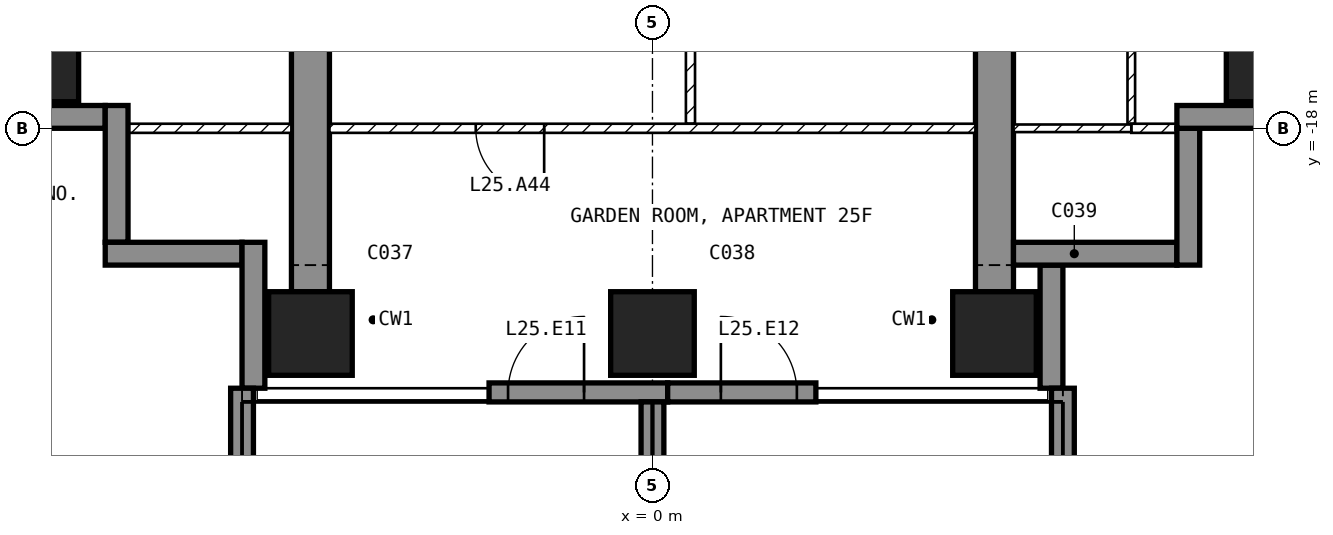
"""IFC4 building model, lengths in metres.
Left out: names, types, materials, properties, quantities, classifications, styles, units other than length and angle.
Written with IfcOpenShell. Run it as: python <this file> out.ifc"""

import sys

from ifc_helpers import new_model, si_unit, direction, frame, frame_2d, origin, origin_2d, place, context, subcontext, project, spatial, polyline, rectangle, outline, extrude, element, fill, save


model = new_model("IFC4")
c1 = context("Model", 3, precision=1e-05, world=origin(), true_north=direction((0.0, 1.0)))
c2 = subcontext(c1, "Body", "Model", "MODEL_VIEW")
j1 = project(units=[si_unit("LENGTHUNIT", "METRE"), si_unit("PLANEANGLEUNIT", "RADIAN")], contexts=[c1])
p1 = place(None, origin())
s1 = spatial("IfcSite", under=j1, at=p1, CompositionType="ELEMENT")
p2 = place(p1, origin())
s2 = spatial("IfcBuilding", under=s1, at=p2, CompositionType="ELEMENT")
p3 = place(p2, frame((0.0, 0.0, 109.4)))
s3 = spatial("IfcBuildingStorey", under=s2, at=p3, CompositionType="ELEMENT", Elevation=109.4)
for number, where, z_axis, x_axis in (
    (1, (-8.1, -17.1, -0.25), (0.0, 0.0, 1.0), (1.0, 0.0, 0.0)),
    (2, (-4.5, -20.7, -0.25), (0.0, 0.0, 1.0), (1.0, 0.0, 0.0)),
    (3, (0.0, -20.7, -0.25), (0.0, 0.0, 1.0), (1.0, 0.0, 0.0)),
    (4, (4.5, -20.7, -0.25), (0.0, 0.0, 1.0), (1.0, 0.0, 0.0)),
    (5, (8.1, -17.1, -0.25), (0.0, 0.0, 1.0), (1.0, 0.0, 0.0)),
):
    element("IfcColumn", number, at=place(p3, frame(where, z_axis=z_axis, x_axis=x_axis)), inside=s3, PredefinedType="COLUMN", context=c2, shape_type="SweptSolid", body=[
        extrude(rectangle(XDim=1.1, YDim=1.1, at=origin_2d()), origin(), (0.0, 0.0, 1.0), 3.5),
    ])
for number, where, z_axis, x_axis in (
    (6, (-4.75, -20.15, -0.25), (1.0, 0.0, 0.0), (0.0, 1.0, 0.0)),
    (7, (4.25, -20.15, -0.25), (1.0, 0.0, 0.0), (0.0, 1.0, 0.0)),
):
    element("IfcWall", number, at=place(p3, frame(where, z_axis=z_axis, x_axis=x_axis)), inside=s3, PredefinedType="SHEAR", context=c2, shape_type="SweptSolid", body=[
        extrude(outline(polyline([(0.0, 0.0), (6.65, 0.0), (6.65, 2.65), (9.05, 2.65), (9.05, 0.0), (11.15, 0.0), (11.15, 3.5), (0.0, 3.5), (0.0, 0.0)])), origin(), (0.0, 0.0, 1.0), 0.5),
    ])
p4 = place(p3, frame((-2.15, -21.475, 0.0), z_axis=(0.0, 0.0, 1.0), x_axis=(1.0, 0.0, 0.0)))
e8 = element("IfcWall", 8, at=p4, inside=s3, PredefinedType="SOLIDWALL", context=c2, shape_type="SweptSolid", body=[
    extrude(rectangle(XDim=2.35, YDim=0.25, at=frame_2d((1.175, 0.0))), origin(), (0.0, 0.0, 1.0), 3.25),
])
p5 = place(p4, frame((0.25, 0.0, 0.0)))
e9 = element("IfcOpeningElement", 9, at=p5, cuts=e8, PredefinedType="OPENING", context=c2, shape_type="SweptSolid", body=[
    extrude(rectangle(XDim=1.0, YDim=2.4, at=frame_2d((0.5, 1.2))), frame((0.0, 0.135, 0.0), z_axis=(0.0, -1.0, 0.0), x_axis=(1.0, 0.0, 0.0)), (0.0, 0.0, 1.0), 0.27),
])
p6 = place(p3, frame((0.2, -21.475, 0.0), z_axis=(0.0, 0.0, 1.0), x_axis=(1.0, 0.0, 0.0)))
e10 = element("IfcWall", 10, at=p6, inside=s3, PredefinedType="SOLIDWALL", context=c2, shape_type="SweptSolid", body=[
    extrude(rectangle(XDim=1.95, YDim=0.25, at=frame_2d((0.975, 0.0))), origin(), (0.0, 0.0, 1.0), 3.25),
])
p7 = place(p6, frame((0.7, 0.0, 0.0)))
e11 = element("IfcOpeningElement", 11, at=p7, cuts=e10, PredefinedType="OPENING", context=c2, shape_type="SweptSolid", body=[
    extrude(rectangle(XDim=1.0, YDim=2.4, at=frame_2d((0.5, 1.2))), frame((0.0, 0.135, 0.0), z_axis=(0.0, -1.0, 0.0), x_axis=(1.0, 0.0, 0.0)), (0.0, 0.0, 1.0), 0.27),
])
p8 = place(p3, frame((5.25, -21.42, 0.0), z_axis=(0.0, 0.0, 1.0), x_axis=(0.0, 1.0, 0.0)))
e12 = element("IfcWall", 12, at=p8, inside=s3, PredefinedType="SOLIDWALL", context=c2, shape_type="SweptSolid", body=[
    extrude(rectangle(XDim=1.62, YDim=0.3, at=frame_2d((0.81, 0.0))), origin(), (0.0, 0.0, 1.0), 3.25),
])
p9 = place(p3, frame((4.75, -19.65, 0.0), z_axis=(0.0, 0.0, 1.0), x_axis=(1.0, 0.0, 0.0)))
e13 = element("IfcWall", 13, at=p9, inside=s3, PredefinedType="SOLIDWALL", context=c2, shape_type="SweptSolid", body=[
    extrude(rectangle(XDim=2.15, YDim=0.3, at=frame_2d((1.075, 0.0))), origin(), (0.0, 0.0, 1.0), 3.25),
])
p10 = place(p3, frame((7.05, -19.8, 0.0), z_axis=(0.0, 0.0, 1.0), x_axis=(0.0, 1.0, 0.0)))
e14 = element("IfcWall", 14, at=p10, inside=s3, PredefinedType="SOLIDWALL", context=c2, shape_type="SweptSolid", body=[
    extrude(rectangle(XDim=1.8, YDim=0.3, at=frame_2d((0.9, 0.0))), origin(), (0.0, 0.0, 1.0), 3.25),
])
p11 = place(p3, frame((6.9, -17.85, 0.0), z_axis=(0.0, 0.0, 1.0), x_axis=(1.0, 0.0, 0.0)))
e15 = element("IfcWall", 15, at=p11, inside=s3, PredefinedType="SOLIDWALL", context=c2, shape_type="SweptSolid", body=[
    extrude(rectangle(XDim=1.85, YDim=0.3, at=frame_2d((0.925, 0.0))), origin(), (0.0, 0.0, 1.0), 3.25),
])
p12 = place(p3, frame((-8.75, -17.85, 0.0), z_axis=(0.0, 0.0, 1.0), x_axis=(1.0, 0.0, 0.0)))
e16 = element("IfcWall", 16, at=p12, inside=s3, PredefinedType="SOLIDWALL", context=c2, shape_type="SweptSolid", body=[
    extrude(rectangle(XDim=1.55, YDim=0.3, at=frame_2d((0.775, 0.0))), origin(), (0.0, 0.0, 1.0), 3.25),
])
for number, where, z_axis, x_axis in (
    (17, (-7.05, -17.7, 0.0), (0.0, 0.0, 1.0), (0.0, -1.0, 0.0)),
    (18, (-7.2, -19.65, 0.0), (0.0, 0.0, 1.0), (1.0, 0.0, 0.0)),
):
    element("IfcWall", number, at=place(p3, frame(where, z_axis=z_axis, x_axis=x_axis)), inside=s3, PredefinedType="SOLIDWALL", context=c2, shape_type="SweptSolid", body=[
        extrude(rectangle(XDim=1.8, YDim=0.3, at=frame_2d((0.9, 0.0))), origin(), (0.0, 0.0, 1.0), 3.25),
    ])
p13 = place(p3, frame((-5.25, -19.5, 0.0), z_axis=(0.0, 0.0, 1.0), x_axis=(0.0, -1.0, 0.0)))
e19 = element("IfcWall", 19, at=p13, inside=s3, PredefinedType="SOLIDWALL", context=c2, shape_type="SweptSolid", body=[
    extrude(rectangle(XDim=1.92, YDim=0.3, at=frame_2d((0.96, 0.0))), origin(), (0.0, 0.0, 1.0), 3.25),
])
p14 = place(p3, frame((-5.4, -21.42, 0.0), z_axis=(0.0, 0.0, 1.0), x_axis=(0.0, -1.0, 0.0)))
e20 = element("IfcWall", 20, at=p14, inside=s3, PredefinedType="SOLIDWALL", context=c2, shape_type="SweptSolid", body=[
    extrude(rectangle(XDim=2.88, YDim=0.3, at=frame_2d((1.44, 0.0))), origin(), (0.0, 0.0, 1.0), 3.25),
])
p15 = place(p3, frame((0.0, -21.6, 0.0), z_axis=(0.0, 0.0, 1.0), x_axis=(0.0, -1.0, 0.0)))
e21 = element("IfcWall", 21, at=p15, inside=s3, PredefinedType="SOLIDWALL", context=c2, shape_type="SweptSolid", body=[
    extrude(rectangle(XDim=2.7, YDim=0.3, at=frame_2d((1.35, 0.0))), origin(), (0.0, 0.0, 1.0), 3.25),
])
p16 = place(p3, frame((5.4, -21.42, 0.0), z_axis=(0.0, 0.0, 1.0), x_axis=(0.0, -1.0, 0.0)))
e22 = element("IfcWall", 22, at=p16, inside=s3, PredefinedType="SOLIDWALL", context=c2, shape_type="SweptSolid", body=[
    extrude(rectangle(XDim=2.88, YDim=0.3, at=frame_2d((1.44, 0.0))), origin(), (0.0, 0.0, 1.0), 3.25),
])
p17 = place(p3, frame((0.5, -15.06, 0.0), z_axis=(0.0, 0.0, 1.0), x_axis=(0.0, -1.0, 0.0)))
e23 = element("IfcWall", 23, at=p17, inside=s3, PredefinedType="PARTITIONING", context=c2, shape_type="SweptSolid", body=[
    extrude(rectangle(XDim=2.88, YDim=0.12, at=frame_2d((1.44, 0.0))), origin(), (0.0, 0.0, 1.0), 3.25),
])
p18 = place(p3, frame((4.25, -18.0, 0.0), z_axis=(0.0, 0.0, 1.0), x_axis=(-1.0, 0.0, 0.0)))
e24 = element("IfcWall", 24, at=p18, inside=s3, PredefinedType="PARTITIONING", context=c2, shape_type="SweptSolid", body=[
    extrude(rectangle(XDim=8.5, YDim=0.12, at=frame_2d((4.25, 0.0))), origin(), (0.0, 0.0, 1.0), 3.25),
])
p19 = place(p18, frame((5.675, 0.0, 0.0)))
e25 = element("IfcOpeningElement", 25, at=p19, cuts=e24, PredefinedType="OPENING", context=c2, shape_type="SweptSolid", body=[
    extrude(rectangle(XDim=0.9, YDim=2.1, at=frame_2d((0.45, 1.05))), frame((0.0, 0.07, 0.0), z_axis=(0.0, -1.0, 0.0), x_axis=(1.0, 0.0, 0.0)), (0.0, 0.0, 1.0), 0.14),
])
p20 = place(p3, frame((6.3, -17.94, 0.0), z_axis=(0.0, 0.0, 1.0), x_axis=(0.0, 1.0, 0.0)))
e26 = element("IfcWall", 26, at=p20, inside=s3, PredefinedType="PARTITIONING", context=c2, shape_type="SweptSolid", body=[
    extrude(rectangle(XDim=3.49, YDim=0.1, at=frame_2d((1.745, 0.0))), origin(), (0.0, 0.0, 1.0), 3.25),
])
p21 = place(p20, frame((1.32, 0.0, 0.0)))
e27 = element("IfcOpeningElement", 27, at=p21, cuts=e26, PredefinedType="OPENING", context=c2, shape_type="SweptSolid", body=[
    extrude(rectangle(XDim=0.85, YDim=2.1, at=frame_2d((0.425, 1.05))), frame((0.0, 0.06, 0.0), z_axis=(0.0, -1.0, 0.0), x_axis=(1.0, 0.0, 0.0)), (0.0, 0.0, 1.0), 0.12),
])
p22 = place(p3, frame((7.12, -18.0, 0.0), z_axis=(0.0, 0.0, 1.0), x_axis=(-1.0, 0.0, 0.0)))
e28 = element("IfcWall", 28, at=p22, inside=s3, PredefinedType="PARTITIONING", context=c2, shape_type="SweptSolid", body=[
    extrude(rectangle(XDim=0.82, YDim=0.12, at=frame_2d((0.41, 0.0))), origin(), (0.0, 0.0, 1.0), 3.25),
])
p23 = place(p3, frame((6.3, -18.0, 0.0), z_axis=(0.0, 0.0, 1.0), x_axis=(-1.0, 0.0, 0.0)))
e29 = element("IfcWall", 29, at=p23, inside=s3, PredefinedType="PARTITIONING", context=c2, shape_type="SweptSolid", body=[
    extrude(rectangle(XDim=1.55, YDim=0.1, at=frame_2d((0.775, 0.0))), origin(), (0.0, 0.0, 1.0), 3.25),
])
p24 = place(p3, frame((-4.75, -18.0, 0.0), z_axis=(0.0, 0.0, 1.0), x_axis=(-1.0, 0.0, 0.0)))
e30 = element("IfcWall", 30, at=p24, inside=s3, PredefinedType="PARTITIONING", context=c2, shape_type="SweptSolid", body=[
    extrude(rectangle(XDim=2.37, YDim=0.12, at=frame_2d((1.185, 0.0))), origin(), (0.0, 0.0, 1.0), 3.25),
])
p25 = place(p5, origin())
e31 = element("IfcDoor", 31, at=p25, inside=s3, OperationType="SINGLE_SWING_RIGHT", PredefinedType="DOOR", context=c2, shape_type="SweptSolid", body=[
    extrude(rectangle(XDim=1.0, YDim=2.4, at=frame_2d((0.5, 1.2))), frame((0.0, 0.025, 0.0), z_axis=(0.0, -1.0, 0.0), x_axis=(1.0, 0.0, 0.0)), (0.0, 0.0, 1.0), 0.05),
])
fill(e9, e31)
p26 = place(p7, origin())
e32 = element("IfcDoor", 32, at=p26, inside=s3, OperationType="SINGLE_SWING_LEFT", PredefinedType="DOOR", context=c2, shape_type="SweptSolid", body=[
    extrude(rectangle(XDim=1.0, YDim=2.4, at=frame_2d((0.5, 1.2))), frame((0.0, 0.025, 0.0), z_axis=(0.0, -1.0, 0.0), x_axis=(1.0, 0.0, 0.0)), (0.0, 0.0, 1.0), 0.05),
])
fill(e11, e32)
p27 = place(p19, origin())
e33 = element("IfcDoor", 33, at=p27, inside=s3, OperationType="SINGLE_SWING_LEFT", PredefinedType="DOOR", context=c2, shape_type="SweptSolid", body=[
    extrude(rectangle(XDim=0.9, YDim=2.1, at=frame_2d((0.45, 1.05))), frame((0.0, 0.025, 0.0), z_axis=(0.0, -1.0, 0.0), x_axis=(1.0, 0.0, 0.0)), (0.0, 0.0, 1.0), 0.05),
])
fill(e25, e33)
save(model, sys.argv[1])
